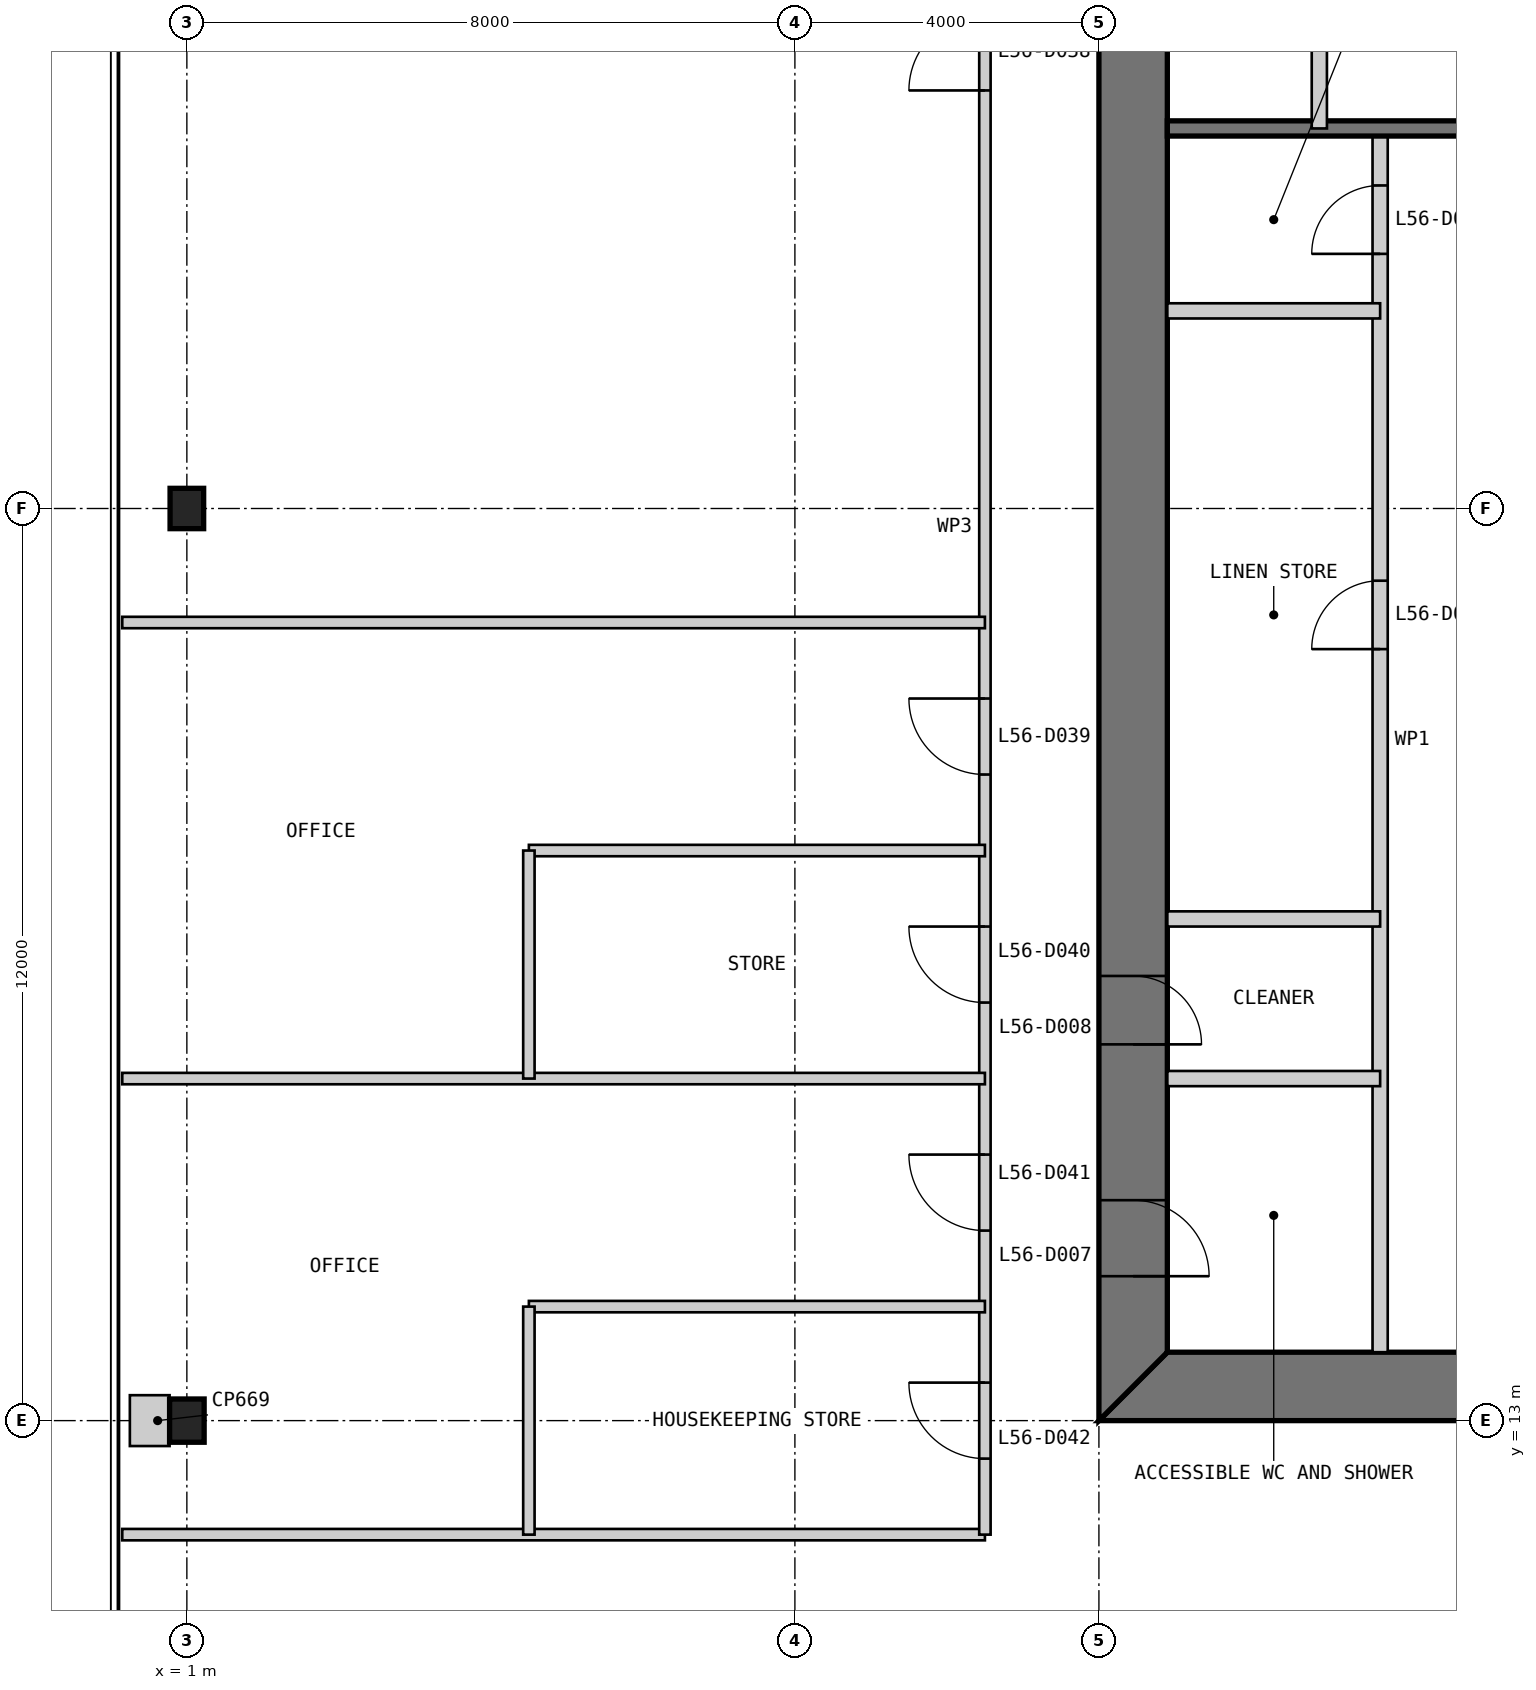
"""IFC4 building model, lengths in metres.
Left out: names, types, materials, properties, quantities, classifications, styles, units other than length and angle.
Written with IfcOpenShell. Run it as: python <this file> out.ifc"""

import sys

from ifc_helpers import new_model, si_unit, direction, frame, frame_2d, origin, origin_2d, place, context, subcontext, project, spatial, polyline, rectangle, i_section, outline, extrude, element, fill, save


model = new_model("IFC4")
c1 = context("Model", 3, precision=1e-05, world=origin(), true_north=direction((0.0, 1.0)))
c2 = subcontext(c1, "Body", "Model", "MODEL_VIEW")
j1 = project(units=[si_unit("LENGTHUNIT", "METRE"), si_unit("PLANEANGLEUNIT", "RADIAN")], contexts=[c1])
p1 = place(None, origin())
s1 = spatial("IfcSite", under=j1, at=p1, CompositionType="ELEMENT")
p2 = place(p1, origin())
s2 = spatial("IfcBuilding", under=s1, at=p2, CompositionType="ELEMENT")
p3 = place(p2, frame((0.0, 0.0, 239.8)))
s3 = spatial("IfcBuildingStorey", under=s2, at=p3, CompositionType="ELEMENT", Elevation=239.8)
p4 = place(p3, frame((1.0, 25.0, 0.0), z_axis=(0.0, 0.0, 1.0), x_axis=(1.0, 0.0, 0.0)))
e1 = element("IfcColumn", 1, at=p4, inside=s3, PredefinedType="COLUMN", context=c2, shape_type="SweptSolid", body=[
    extrude(i_section(OverallWidth=0.442, OverallDepth=0.531, WebThickness=0.066, FlangeThickness=0.106, at=origin_2d()), origin(), (0.0, 0.0, 1.0), 6.0),
])
p5 = place(p3, frame((1.0, 13.0, 0.0), z_axis=(0.0, 0.0, 1.0), x_axis=(1.0, 0.0, 0.0)))
e2 = element("IfcColumn", 2, at=p5, inside=s3, PredefinedType="COLUMN", context=c2, shape_type="SweptSolid", body=[
    extrude(i_section(OverallWidth=0.455, OverallDepth=0.569, WebThickness=0.078, FlangeThickness=0.125, at=origin_2d()), origin(), (0.0, 0.0, 1.0), 6.0),
])
p6 = place(p3, frame((13.0, 13.45, 0.0), z_axis=(0.0, 0.0, 1.0), x_axis=(1.0, 0.0, 0.0)))
e3 = element("IfcWall", 3, at=p6, inside=s3, PredefinedType="SHEAR", context=c2, shape_type="SweptSolid", body=[
    extrude(outline(polyline([(0.0, -0.45), (24.0, -0.45), (23.1, 0.45), (0.9, 0.45), (0.0, -0.45)])), origin(), (0.0, 0.0, 1.0), 6.0),
])
p7 = place(p6, frame((4.9, 0.0, 0.0)))
e4 = element("IfcOpeningElement", 4, at=p7, cuts=e3, PredefinedType="OPENING", context=c2, shape_type="SweptSolid", body=[
    extrude(rectangle(XDim=1.0, YDim=2.2, at=frame_2d((0.5, 1.1))), frame((0.0, 0.46, 0.0), z_axis=(0.0, -1.0, 0.0), x_axis=(1.0, 0.0, 0.0)), (0.0, 0.0, 1.0), 0.92),
])
p8 = place(p6, frame((8.9, 0.0, 0.0)))
e5 = element("IfcOpeningElement", 5, at=p8, cuts=e3, PredefinedType="OPENING", context=c2, shape_type="SweptSolid", body=[
    extrude(rectangle(XDim=1.1, YDim=2.2, at=frame_2d((0.55, 1.1))), frame((0.0, 0.46, 0.0), z_axis=(0.0, -1.0, 0.0), x_axis=(1.0, 0.0, 0.0)), (0.0, 0.0, 1.0), 0.92),
])
p9 = place(p6, frame((15.05, 0.0, 0.0)))
e6 = element("IfcOpeningElement", 6, at=p9, cuts=e3, PredefinedType="OPENING", context=c2, shape_type="SweptSolid", body=[
    extrude(rectangle(XDim=0.9, YDim=2.2, at=frame_2d((0.45, 1.1))), frame((0.0, 0.46, 0.0), z_axis=(0.0, -1.0, 0.0), x_axis=(1.0, 0.0, 0.0)), (0.0, 0.0, 1.0), 0.92),
])
p10 = place(p6, frame((17.9, 0.0, 0.0)))
e7 = element("IfcOpeningElement", 7, at=p10, cuts=e3, PredefinedType="OPENING", context=c2, shape_type="SweptSolid", body=[
    extrude(rectangle(XDim=1.0, YDim=2.2, at=frame_2d((0.5, 1.1))), frame((0.0, 0.46, 0.0), z_axis=(0.0, -1.0, 0.0), x_axis=(1.0, 0.0, 0.0)), (0.0, 0.0, 1.0), 0.92),
])
p11 = place(p6, frame((21.4, 0.0, 0.0)))
e8 = element("IfcOpeningElement", 8, at=p11, cuts=e3, PredefinedType="OPENING", context=c2, shape_type="SweptSolid", body=[
    extrude(rectangle(XDim=1.0, YDim=2.2, at=frame_2d((0.5, 1.1))), frame((0.0, 0.46, 0.0), z_axis=(0.0, -1.0, 0.0), x_axis=(1.0, 0.0, 0.0)), (0.0, 0.0, 1.0), 0.92),
])
p12 = place(p3, frame((13.45, 36.1, 0.0), z_axis=(0.0, 0.0, 1.0), x_axis=(0.0, -1.0, 0.0)))
e9 = element("IfcWall", 9, at=p12, inside=s3, PredefinedType="SHEAR", context=c2, shape_type="SweptSolid", body=[
    extrude(outline(polyline([(-0.9, -0.45), (23.1, -0.45), (22.2, 0.45), (0.0, 0.45), (-0.9, -0.45)])), origin(), (0.0, 0.0, 1.0), 6.0),
])
p13 = place(p12, frame((20.2, 0.0, 0.0)))
e10 = element("IfcOpeningElement", 10, at=p13, cuts=e9, PredefinedType="OPENING", context=c2, shape_type="SweptSolid", body=[
    extrude(rectangle(XDim=1.0, YDim=2.2, at=frame_2d((0.5, 1.1))), frame((0.0, 0.46, 0.0), z_axis=(0.0, -1.0, 0.0), x_axis=(1.0, 0.0, 0.0)), (0.0, 0.0, 1.0), 0.92),
])
p14 = place(p12, frame((17.25, 0.0, 0.0)))
e11 = element("IfcOpeningElement", 11, at=p14, cuts=e9, PredefinedType="OPENING", context=c2, shape_type="SweptSolid", body=[
    extrude(rectangle(XDim=0.9, YDim=2.2, at=frame_2d((0.45, 1.1))), frame((0.0, 0.46, 0.0), z_axis=(0.0, -1.0, 0.0), x_axis=(1.0, 0.0, 0.0)), (0.0, 0.0, 1.0), 0.92),
])
p15 = place(p3, frame((16.7, 13.9, 0.0), z_axis=(0.0, 0.0, 1.0), x_axis=(0.0, 1.0, 0.0)))
e12 = element("IfcWall", 12, at=p15, inside=s3, PredefinedType="PARTITIONING", context=c2, shape_type="SweptSolid", body=[
    extrude(rectangle(XDim=16.1, YDim=0.2, at=frame_2d((8.05, 0.0))), origin(), (0.0, 0.0, 1.0), 5.8),
])
p16 = place(p15, frame((9.25, 0.0, 0.0)))
e13 = element("IfcOpeningElement", 13, at=p16, cuts=e12, PredefinedType="OPENING", context=c2, shape_type="SweptSolid", body=[
    extrude(rectangle(XDim=0.9, YDim=2.2, at=frame_2d((0.45, 1.1))), frame((0.0, 0.11, 0.0), z_axis=(0.0, -1.0, 0.0), x_axis=(1.0, 0.0, 0.0)), (0.0, 0.0, 1.0), 0.22),
])
p17 = place(p15, frame((14.45, 0.0, 0.0)))
e14 = element("IfcOpeningElement", 14, at=p17, cuts=e12, PredefinedType="OPENING", context=c2, shape_type="SweptSolid", body=[
    extrude(rectangle(XDim=0.9, YDim=2.2, at=frame_2d((0.45, 1.1))), frame((0.0, 0.11, 0.0), z_axis=(0.0, -1.0, 0.0), x_axis=(1.0, 0.0, 0.0)), (0.0, 0.0, 1.0), 0.22),
])
for number, where, z_axis, x_axis in (
    (15, (13.9, 17.5, 0.0), (0.0, 0.0, 1.0), (1.0, 0.0, 0.0)),
    (16, (13.9, 19.6, 0.0), (0.0, 0.0, 1.0), (1.0, 0.0, 0.0)),
    (17, (13.9, 27.6, 0.0), (0.0, 0.0, 1.0), (1.0, 0.0, 0.0)),
):
    element("IfcWall", number, at=place(p3, frame(where, z_axis=z_axis, x_axis=x_axis)), inside=s3, PredefinedType="PARTITIONING", context=c2, shape_type="SweptSolid", body=[
        extrude(rectangle(XDim=2.8, YDim=0.2, at=frame_2d((1.4, 0.0))), origin(), (0.0, 0.0, 1.0), 5.8),
    ])
p18 = place(p3, frame((29.7, 30.0, 0.0), z_axis=(0.0, 0.0, 1.0), x_axis=(-1.0, 0.0, 0.0)))
e18 = element("IfcWall", 18, at=p18, inside=s3, PredefinedType="SOLIDWALL", context=c2, shape_type="SweptSolid", body=[
    extrude(rectangle(XDim=15.8, YDim=0.2, at=frame_2d((7.9, 0.0))), origin(), (0.0, 0.0, 1.0), 5.8),
])
p19 = place(p3, frame((15.9, 36.1, 0.0), z_axis=(0.0, 0.0, 1.0), x_axis=(0.0, -1.0, 0.0)))
e19 = element("IfcWall", 19, at=p19, inside=s3, PredefinedType="PARTITIONING", context=c2, shape_type="SweptSolid", body=[
    extrude(rectangle(XDim=6.1, YDim=0.2, at=frame_2d((3.05, 0.0))), origin(), (0.0, 0.0, 1.0), 5.8),
])
p20 = place(p3, frame((0.15, 11.5, 0.0), z_axis=(0.0, 0.0, 1.0), x_axis=(1.0, 0.0, 0.0)))
e20 = element("IfcWall", 20, at=p20, inside=s3, PredefinedType="PARTITIONING", context=c2, shape_type="SweptSolid", body=[
    extrude(rectangle(XDim=11.35, YDim=0.15, at=frame_2d((5.675, 0.0))), origin(), (0.0, 0.0, 1.0), 5.85),
])
p21 = place(p3, frame((11.5, 38.5, 0.0), z_axis=(0.0, 0.0, 1.0), x_axis=(0.0, -1.0, 0.0)))
e21 = element("IfcWall", 21, at=p21, inside=s3, PredefinedType="PARTITIONING", context=c2, shape_type="SweptSolid", body=[
    extrude(rectangle(XDim=27.0, YDim=0.15, at=frame_2d((13.5, 0.0))), origin(), (0.0, 0.0, 1.0), 5.85),
])
p22 = place(p21, frame((7.0, 0.0, 0.0)))
e22 = element("IfcOpeningElement", 22, at=p22, cuts=e21, PredefinedType="OPENING", context=c2, shape_type="SweptSolid", body=[
    extrude(rectangle(XDim=1.0, YDim=2.2, at=frame_2d((0.5, 1.1))), frame((0.0, 0.085, 0.0), z_axis=(0.0, -1.0, 0.0), x_axis=(1.0, 0.0, 0.0)), (0.0, 0.0, 1.0), 0.17),
])
p23 = place(p21, frame((16.0, 0.0, 0.0)))
e23 = element("IfcOpeningElement", 23, at=p23, cuts=e21, PredefinedType="OPENING", context=c2, shape_type="SweptSolid", body=[
    extrude(rectangle(XDim=1.0, YDim=2.2, at=frame_2d((0.5, 1.1))), frame((0.0, 0.085, 0.0), z_axis=(0.0, -1.0, 0.0), x_axis=(1.0, 0.0, 0.0)), (0.0, 0.0, 1.0), 0.17),
])
p24 = place(p21, frame((19.0, 0.0, 0.0)))
e24 = element("IfcOpeningElement", 24, at=p24, cuts=e21, PredefinedType="OPENING", context=c2, shape_type="SweptSolid", body=[
    extrude(rectangle(XDim=1.0, YDim=2.2, at=frame_2d((0.5, 1.1))), frame((0.0, 0.085, 0.0), z_axis=(0.0, -1.0, 0.0), x_axis=(1.0, 0.0, 0.0)), (0.0, 0.0, 1.0), 0.17),
])
p25 = place(p21, frame((22.0, 0.0, 0.0)))
e25 = element("IfcOpeningElement", 25, at=p25, cuts=e21, PredefinedType="OPENING", context=c2, shape_type="SweptSolid", body=[
    extrude(rectangle(XDim=1.0, YDim=2.2, at=frame_2d((0.5, 1.1))), frame((0.0, 0.085, 0.0), z_axis=(0.0, -1.0, 0.0), x_axis=(1.0, 0.0, 0.0)), (0.0, 0.0, 1.0), 0.17),
])
p26 = place(p21, frame((25.0, 0.0, 0.0)))
e26 = element("IfcOpeningElement", 26, at=p26, cuts=e21, PredefinedType="OPENING", context=c2, shape_type="SweptSolid", body=[
    extrude(rectangle(XDim=1.0, YDim=2.2, at=frame_2d((0.5, 1.1))), frame((0.0, 0.085, 0.0), z_axis=(0.0, -1.0, 0.0), x_axis=(1.0, 0.0, 0.0)), (0.0, 0.0, 1.0), 0.17),
])
p27 = place(p3, frame((0.15, 23.5, 0.0), z_axis=(0.0, 0.0, 1.0), x_axis=(1.0, 0.0, 0.0)))
e27 = element("IfcWall", 27, at=p27, inside=s3, PredefinedType="PARTITIONING", context=c2, shape_type="SweptSolid", body=[
    extrude(rectangle(XDim=11.35, YDim=0.15, at=frame_2d((5.675, 0.0))), origin(), (0.0, 0.0, 1.0), 5.85),
])
p28 = place(p3, frame((5.5, 20.5, 0.0), z_axis=(0.0, 0.0, 1.0), x_axis=(1.0, 0.0, 0.0)))
e28 = element("IfcWall", 28, at=p28, inside=s3, PredefinedType="PARTITIONING", context=c2, shape_type="SweptSolid", body=[
    extrude(rectangle(XDim=6.0, YDim=0.15, at=frame_2d((3.0, 0.0))), origin(), (0.0, 0.0, 1.0), 5.85),
])
p29 = place(p3, frame((0.15, 17.5, 0.0), z_axis=(0.0, 0.0, 1.0), x_axis=(1.0, 0.0, 0.0)))
e29 = element("IfcWall", 29, at=p29, inside=s3, PredefinedType="PARTITIONING", context=c2, shape_type="SweptSolid", body=[
    extrude(rectangle(XDim=11.35, YDim=0.15, at=frame_2d((5.675, 0.0))), origin(), (0.0, 0.0, 1.0), 5.85),
])
p30 = place(p3, frame((5.5, 14.5, 0.0), z_axis=(0.0, 0.0, 1.0), x_axis=(1.0, 0.0, 0.0)))
e30 = element("IfcWall", 30, at=p30, inside=s3, PredefinedType="PARTITIONING", context=c2, shape_type="SweptSolid", body=[
    extrude(rectangle(XDim=6.0, YDim=0.15, at=frame_2d((3.0, 0.0))), origin(), (0.0, 0.0, 1.0), 5.85),
])
for number, where, z_axis, x_axis in (
    (31, (5.5, 20.5, 0.0), (0.0, 0.0, 1.0), (0.0, -1.0, 0.0)),
    (32, (5.5, 14.5, 0.0), (0.0, 0.0, 1.0), (0.0, -1.0, 0.0)),
):
    element("IfcWall", number, at=place(p3, frame(where, z_axis=z_axis, x_axis=x_axis)), inside=s3, PredefinedType="PARTITIONING", context=c2, shape_type="SweptSolid", body=[
        extrude(rectangle(XDim=3.0, YDim=0.15, at=frame_2d((1.5, 0.0))), origin(), (0.0, 0.0, 1.0), 5.85),
    ])
p31 = place(p3, frame((0.25, 13.0, 0.0), z_axis=(0.0, 0.0, 1.0), x_axis=(1.0, 0.0, 0.0)))
e33 = element("IfcWall", 33, at=p31, inside=s3, PredefinedType="PARTITIONING", context=c2, shape_type="SweptSolid", body=[
    extrude(rectangle(XDim=0.523, YDim=0.669, at=frame_2d((0.261, 0.0))), origin(), (0.0, 0.0, 1.0), 5.85),
])
p32 = place(p13, origin())
e34 = element("IfcDoor", 34, at=p32, inside=s3, OperationType="SINGLE_SWING_RIGHT", PredefinedType="DOOR", context=c2, shape_type="SweptSolid", body=[
    extrude(rectangle(XDim=1.0, YDim=2.2, at=frame_2d((0.5, 1.1))), frame((0.0, 0.025, 0.0), z_axis=(0.0, -1.0, 0.0), x_axis=(1.0, 0.0, 0.0)), (0.0, 0.0, 1.0), 0.05),
    extrude(outline(polyline([(0.0, 0.0), (0.04, 0.0), (0.04, 2.16), (0.96, 2.16), (0.96, 0.0), (1.0, 0.0), (1.0, 2.2), (0.0, 2.2), (0.0, 0.0)])), frame((0.0, 0.3, 0.0), z_axis=(0.0, -1.0, 0.0), x_axis=(1.0, 0.0, 0.0)), (0.0, 0.0, 1.0), 0.6),
])
fill(e10, e34)
p33 = place(p14, origin())
e35 = element("IfcDoor", 35, at=p33, inside=s3, OperationType="SINGLE_SWING_RIGHT", PredefinedType="DOOR", context=c2, shape_type="SweptSolid", body=[
    extrude(rectangle(XDim=0.9, YDim=2.2, at=frame_2d((0.45, 1.1))), frame((0.0, 0.025, 0.0), z_axis=(0.0, -1.0, 0.0), x_axis=(1.0, 0.0, 0.0)), (0.0, 0.0, 1.0), 0.05),
    extrude(outline(polyline([(0.0, 0.0), (0.04, 0.0), (0.04, 2.16), (0.86, 2.16), (0.86, 0.0), (0.9, 0.0), (0.9, 2.2), (0.0, 2.2), (0.0, 0.0)])), frame((0.0, 0.3, 0.0), z_axis=(0.0, -1.0, 0.0), x_axis=(1.0, 0.0, 0.0)), (0.0, 0.0, 1.0), 0.6),
])
fill(e11, e35)
p34 = place(p16, origin())
e36 = element("IfcDoor", 36, at=p34, inside=s3, OperationType="SINGLE_SWING_LEFT", PredefinedType="DOOR", context=c2, shape_type="SweptSolid", body=[
    extrude(rectangle(XDim=0.9, YDim=2.2, at=frame_2d((0.45, 1.1))), frame((0.0, 0.025, 0.0), z_axis=(0.0, -1.0, 0.0), x_axis=(1.0, 0.0, 0.0)), (0.0, 0.0, 1.0), 0.05),
])
fill(e13, e36)
p35 = place(p17, origin())
e37 = element("IfcDoor", 37, at=p35, inside=s3, OperationType="SINGLE_SWING_LEFT", PredefinedType="DOOR", context=c2, shape_type="SweptSolid", body=[
    extrude(rectangle(XDim=0.9, YDim=2.2, at=frame_2d((0.45, 1.1))), frame((0.0, 0.025, 0.0), z_axis=(0.0, -1.0, 0.0), x_axis=(1.0, 0.0, 0.0)), (0.0, 0.0, 1.0), 0.05),
])
fill(e14, e37)
p36 = place(p22, frame((1.0, 0.0, 0.0), z_axis=(0.0, 0.0, 1.0), x_axis=(-1.0, 0.0, 0.0)))
e38 = element("IfcDoor", 38, at=p36, inside=s3, OperationType="SINGLE_SWING_LEFT", PredefinedType="DOOR", context=c2, shape_type="SweptSolid", body=[
    extrude(rectangle(XDim=1.0, YDim=2.2, at=frame_2d((0.5, 1.1))), frame((0.0, 0.025, 0.0), z_axis=(0.0, -1.0, 0.0), x_axis=(1.0, 0.0, 0.0)), (0.0, 0.0, 1.0), 0.05),
])
fill(e22, e38)
p37 = place(p23, frame((1.0, 0.0, 0.0), z_axis=(0.0, 0.0, 1.0), x_axis=(-1.0, 0.0, 0.0)))
e39 = element("IfcDoor", 39, at=p37, inside=s3, OperationType="SINGLE_SWING_RIGHT", PredefinedType="DOOR", context=c2, shape_type="SweptSolid", body=[
    extrude(rectangle(XDim=1.0, YDim=2.2, at=frame_2d((0.5, 1.1))), frame((0.0, 0.025, 0.0), z_axis=(0.0, -1.0, 0.0), x_axis=(1.0, 0.0, 0.0)), (0.0, 0.0, 1.0), 0.05),
])
fill(e23, e39)
p38 = place(p24, frame((1.0, 0.0, 0.0), z_axis=(0.0, 0.0, 1.0), x_axis=(-1.0, 0.0, 0.0)))
e40 = element("IfcDoor", 40, at=p38, inside=s3, OperationType="SINGLE_SWING_RIGHT", PredefinedType="DOOR", context=c2, shape_type="SweptSolid", body=[
    extrude(rectangle(XDim=1.0, YDim=2.2, at=frame_2d((0.5, 1.1))), frame((0.0, 0.025, 0.0), z_axis=(0.0, -1.0, 0.0), x_axis=(1.0, 0.0, 0.0)), (0.0, 0.0, 1.0), 0.05),
])
fill(e24, e40)
p39 = place(p25, frame((1.0, 0.0, 0.0), z_axis=(0.0, 0.0, 1.0), x_axis=(-1.0, 0.0, 0.0)))
e41 = element("IfcDoor", 41, at=p39, inside=s3, OperationType="SINGLE_SWING_RIGHT", PredefinedType="DOOR", context=c2, shape_type="SweptSolid", body=[
    extrude(rectangle(XDim=1.0, YDim=2.2, at=frame_2d((0.5, 1.1))), frame((0.0, 0.025, 0.0), z_axis=(0.0, -1.0, 0.0), x_axis=(1.0, 0.0, 0.0)), (0.0, 0.0, 1.0), 0.05),
])
fill(e25, e41)
p40 = place(p26, frame((1.0, 0.0, 0.0), z_axis=(0.0, 0.0, 1.0), x_axis=(-1.0, 0.0, 0.0)))
e42 = element("IfcDoor", 42, at=p40, inside=s3, OperationType="SINGLE_SWING_RIGHT", PredefinedType="DOOR", context=c2, shape_type="SweptSolid", body=[
    extrude(rectangle(XDim=1.0, YDim=2.2, at=frame_2d((0.5, 1.1))), frame((0.0, 0.025, 0.0), z_axis=(0.0, -1.0, 0.0), x_axis=(1.0, 0.0, 0.0)), (0.0, 0.0, 1.0), 0.05),
])
fill(e26, e42)
save(model, sys.argv[1])
